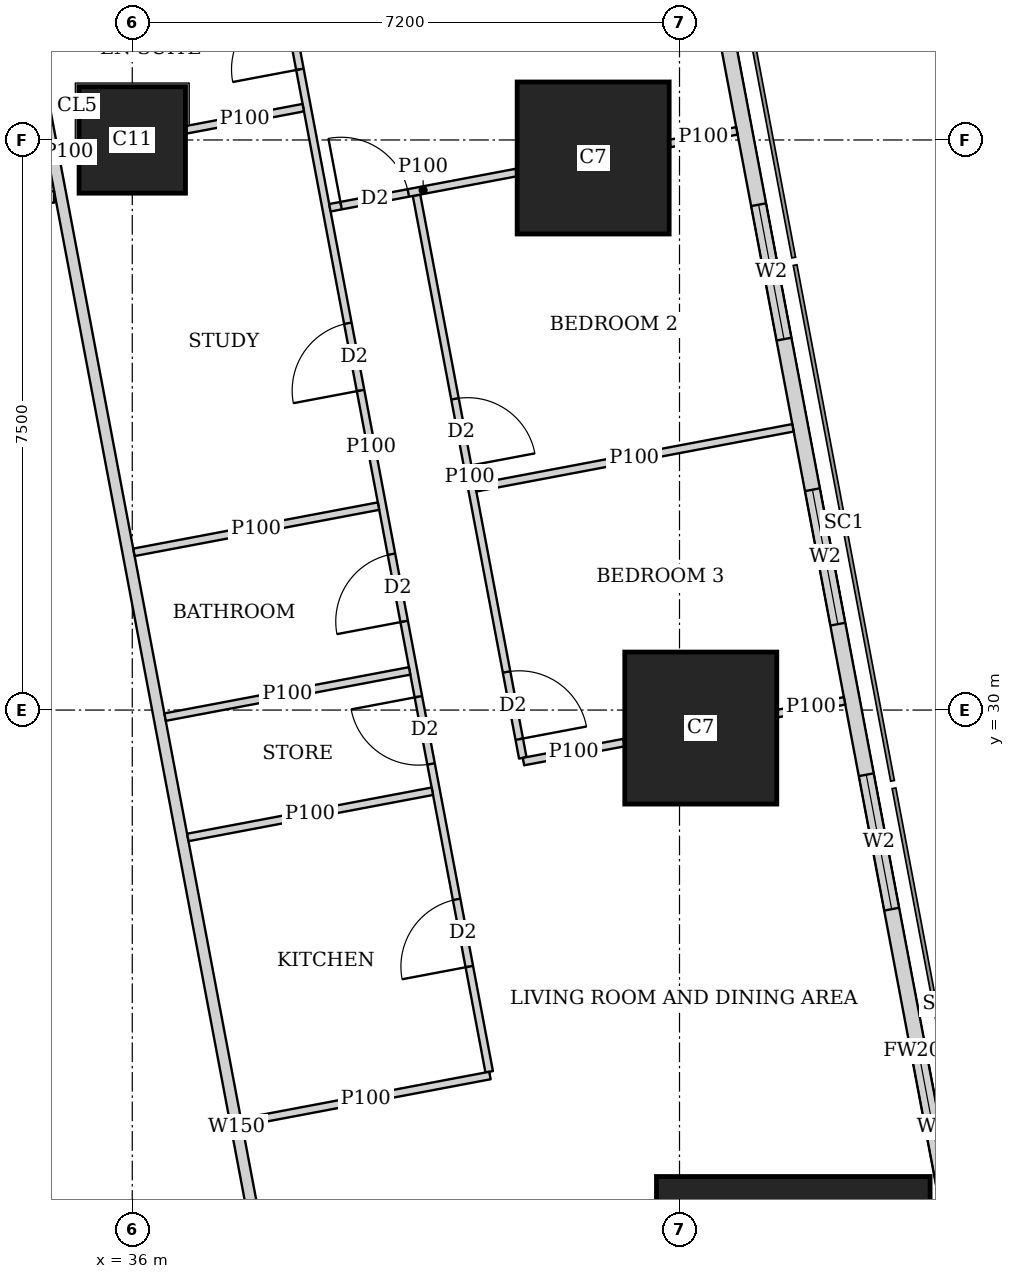
"""IFC4 building model, lengths in metres.
Left out: names, types, materials, properties, quantities, classifications, styles, units other than length and angle.
Written with IfcOpenShell. Run it as: python <this file> out.ifc"""

import sys

from ifc_helpers import new_model, si_unit, direction, frame, frame_2d, origin, origin_2d, place, context, subcontext, project, spatial, rectangle, extrude, element, fill, save


model = new_model("IFC4")
c1 = context("Model", 3, precision=1e-05, world=origin(), true_north=direction((0.0, 1.0)))
c2 = subcontext(c1, "Body", "Model", "MODEL_VIEW")
j1 = project(units=[si_unit("LENGTHUNIT", "METRE"), si_unit("PLANEANGLEUNIT", "RADIAN")], contexts=[c1])
p1 = place(None, origin())
s1 = spatial("IfcSite", under=j1, at=p1, CompositionType="ELEMENT")
p2 = place(p1, origin())
s2 = spatial("IfcBuilding", under=s1, at=p2, CompositionType="ELEMENT")
p3 = place(p2, frame((0.0, 0.0, 289.1)))
s3 = spatial("IfcBuildingStorey", under=s2, at=p3, CompositionType="ELEMENT", Elevation=289.1)
p4 = place(p3, frame((44.697, 22.263, 0.0), z_axis=(0.0, 0.0, 1.0), x_axis=(1.0, 0.0, 0.0)))
e1 = element("IfcColumn", 1, at=p4, inside=s3, PredefinedType="COLUMN", context=c2, shape_type="SweptSolid", body=[
    extrude(rectangle(XDim=3.6, YDim=3.2, at=origin_2d()), origin(), (0.0, 0.0, 1.0), 3.75),
])
p5 = place(p3, frame((43.48, 29.763, 0.0), z_axis=(0.0, 0.0, 1.0), x_axis=(1.0, 0.0, 0.0)))
e2 = element("IfcColumn", 2, at=p5, inside=s3, PredefinedType="COLUMN", context=c2, shape_type="SweptSolid", body=[
    extrude(rectangle(XDim=2.0, YDim=2.0, at=origin_2d()), origin(), (0.0, 0.0, 1.0), 3.75),
])
p6 = place(p3, frame((36.0, 37.5, 0.0), z_axis=(0.0, 0.0, 1.0), x_axis=(1.0, 0.0, 0.0)))
e3 = element("IfcColumn", 3, at=p6, inside=s3, PredefinedType="COLUMN", context=c2, shape_type="SweptSolid", body=[
    extrude(rectangle(XDim=1.4, YDim=1.4, at=origin_2d()), origin(), (0.0, 0.0, 1.0), 3.75),
])
p7 = place(p3, frame((42.064, 37.263, 0.0), z_axis=(0.0, 0.0, 1.0), x_axis=(1.0, 0.0, 0.0)))
e4 = element("IfcColumn", 4, at=p7, inside=s3, PredefinedType="COLUMN", context=c2, shape_type="SweptSolid", body=[
    extrude(rectangle(XDim=2.0, YDim=2.0, at=origin_2d()), origin(), (0.0, 0.0, 1.0), 3.75),
])
p8 = place(p3, frame((49.684, 7.832, 0.0), z_axis=(0.0, 0.0, 1.0), x_axis=(-0.185616669694, 0.982622232565, 0.0)))
e5 = element("IfcWall", 5, at=p8, inside=s3, PredefinedType="SOLIDWALL", context=c2, shape_type="SweptSolid", body=[
    extrude(rectangle(XDim=36.0, YDim=0.2, at=frame_2d((18.0, 0.0))), origin(), (0.0, 0.0, 1.0), 3.5),
])
p9 = place(p8, frame((2.518, 0.0, 0.9)))
e6 = element("IfcOpeningElement", 6, at=p9, cuts=e5, PredefinedType="OPENING", context=c2, shape_type="SweptSolid", body=[
    extrude(rectangle(XDim=2.4, YDim=1.5, at=frame_2d((1.2, 0.75))), frame((0.0, 0.11, 0.0), z_axis=(0.0, -1.0, 0.0), x_axis=(1.0, 0.0, 0.0)), (0.0, 0.0, 1.0), 0.22),
])
p10 = place(p8, frame((8.444, 0.0, 0.9)))
e7 = element("IfcOpeningElement", 7, at=p10, cuts=e5, PredefinedType="OPENING", context=c2, shape_type="SweptSolid", body=[
    extrude(rectangle(XDim=1.8, YDim=1.5, at=frame_2d((0.9, 0.75))), frame((0.0, 0.11, 0.0), z_axis=(0.0, -1.0, 0.0), x_axis=(1.0, 0.0, 0.0)), (0.0, 0.0, 1.0), 0.22),
])
p11 = place(p8, frame((12.261, 0.0, 0.9)))
e8 = element("IfcOpeningElement", 8, at=p11, cuts=e5, PredefinedType="OPENING", context=c2, shape_type="SweptSolid", body=[
    extrude(rectangle(XDim=1.8, YDim=1.5, at=frame_2d((0.9, 0.75))), frame((0.0, 0.11, 0.0), z_axis=(0.0, -1.0, 0.0), x_axis=(1.0, 0.0, 0.0)), (0.0, 0.0, 1.0), 0.22),
])
p12 = place(p8, frame((16.078, 0.0, 0.9)))
e9 = element("IfcOpeningElement", 9, at=p12, cuts=e5, PredefinedType="OPENING", context=c2, shape_type="SweptSolid", body=[
    extrude(rectangle(XDim=1.8, YDim=1.5, at=frame_2d((0.9, 0.75))), frame((0.0, 0.11, 0.0), z_axis=(0.0, -1.0, 0.0), x_axis=(1.0, 0.0, 0.0)), (0.0, 0.0, 1.0), 0.22),
])
p13 = place(p8, frame((19.894, 0.0, 0.9)))
e10 = element("IfcOpeningElement", 10, at=p13, cuts=e5, PredefinedType="OPENING", context=c2, shape_type="SweptSolid", body=[
    extrude(rectangle(XDim=1.8, YDim=1.5, at=frame_2d((0.9, 0.75))), frame((0.0, 0.11, 0.0), z_axis=(0.0, -1.0, 0.0), x_axis=(1.0, 0.0, 0.0)), (0.0, 0.0, 1.0), 0.22),
])
p14 = place(p8, frame((23.71, 0.0, 0.9)))
e11 = element("IfcOpeningElement", 11, at=p14, cuts=e5, PredefinedType="OPENING", context=c2, shape_type="SweptSolid", body=[
    extrude(rectangle(XDim=1.8, YDim=1.5, at=frame_2d((0.9, 0.75))), frame((0.0, 0.11, 0.0), z_axis=(0.0, -1.0, 0.0), x_axis=(1.0, 0.0, 0.0)), (0.0, 0.0, 1.0), 0.22),
])
p15 = place(p8, frame((27.526, 0.0, 0.9)))
e12 = element("IfcOpeningElement", 12, at=p15, cuts=e5, PredefinedType="OPENING", context=c2, shape_type="SweptSolid", body=[
    extrude(rectangle(XDim=1.8, YDim=1.5, at=frame_2d((0.9, 0.75))), frame((0.0, 0.11, 0.0), z_axis=(0.0, -1.0, 0.0), x_axis=(1.0, 0.0, 0.0)), (0.0, 0.0, 1.0), 0.22),
])
p16 = place(p8, frame((32.046, 0.0, 0.9)))
e13 = element("IfcOpeningElement", 13, at=p16, cuts=e5, PredefinedType="OPENING", context=c2, shape_type="SweptSolid", body=[
    extrude(rectangle(XDim=1.8, YDim=1.5, at=frame_2d((0.9, 0.75))), frame((0.0, 0.11, 0.0), z_axis=(0.0, -1.0, 0.0), x_axis=(1.0, 0.0, 0.0)), (0.0, 0.0, 1.0), 0.22),
])
p17 = place(p3, frame((29.501, 36.75, 0.0), z_axis=(0.0, 0.0, 1.0), x_axis=(1.0, 0.0, 0.0)))
e14 = element("IfcWall", 14, at=p17, inside=s3, PredefinedType="SOLIDWALL", context=c2, shape_type="SweptSolid", body=[
    extrude(rectangle(XDim=5.471, YDim=0.15, at=frame_2d((2.735, 0.0))), origin(), (0.0, 0.0, 1.0), 3.5),
])
p18 = place(p3, frame((34.036, 42.186, 0.0), z_axis=(0.0, 0.0, 1.0), x_axis=(0.185593518645, -0.9826266055, 0.0)))
e15 = element("IfcWall", 15, at=p18, inside=s3, PredefinedType="SOLIDWALL", context=c2, shape_type="SweptSolid", body=[
    extrude(rectangle(XDim=35.961, YDim=0.15, at=frame_2d((17.98, 0.0))), origin(), (0.0, 0.0, 1.0), 2.5),
])
p19 = place(p18, frame((19.345, 0.0, 0.0)))
e16 = element("IfcOpeningElement", 16, at=p19, cuts=e15, PredefinedType="OPENING", context=c2, shape_type="SweptSolid", body=[
    extrude(rectangle(XDim=1.0, YDim=2.1, at=frame_2d((0.5, 1.05))), frame((0.0, 0.085, 0.0), z_axis=(0.0, -1.0, 0.0), x_axis=(1.0, 0.0, 0.0)), (0.0, 0.0, 1.0), 0.17),
])
p20 = place(p18, frame((33.774, 0.0, 0.0)))
e17 = element("IfcOpeningElement", 17, at=p20, cuts=e15, PredefinedType="OPENING", context=c2, shape_type="SweptSolid", body=[
    extrude(rectangle(XDim=1.0, YDim=2.1, at=frame_2d((0.5, 1.05))), frame((0.0, 0.085, 0.0), z_axis=(0.0, -1.0, 0.0), x_axis=(1.0, 0.0, 0.0)), (0.0, 0.0, 1.0), 0.17),
])
p21 = place(p3, frame((43.955, 37.62, 0.0), z_axis=(0.0, 0.0, 1.0), x_axis=(-0.982708424405, -0.18515980288, 0.0)))
e18 = element("IfcWall", 18, at=p21, inside=s3, PredefinedType="PARTITIONING", context=c2, shape_type="SweptSolid", body=[
    extrude(rectangle(XDim=0.897, YDim=0.1, at=frame_2d((0.448, 0.0))), origin(), (0.0, 0.0, 1.0), 3.5),
])
p22 = place(p3, frame((41.054, 37.072, 0.0), z_axis=(0.0, 0.0, 1.0), x_axis=(-0.982579896219, -0.185840650951, 0.0)))
e19 = element("IfcWall", 19, at=p22, inside=s3, PredefinedType="PARTITIONING", context=c2, shape_type="SweptSolid", body=[
    extrude(rectangle(XDim=2.497, YDim=0.1, at=frame_2d((1.249, 0.0))), origin(), (0.0, 0.0, 1.0), 3.5),
])
p23 = place(p22, frame((1.447, 0.0, 0.0)))
e20 = element("IfcOpeningElement", 20, at=p23, cuts=e19, PredefinedType="OPENING", context=c2, shape_type="SweptSolid", body=[
    extrude(rectangle(XDim=0.9, YDim=2.1, at=frame_2d((0.45, 1.05))), frame((0.0, 0.06, 0.0), z_axis=(0.0, -1.0, 0.0), x_axis=(1.0, 0.0, 0.0)), (0.0, 0.0, 1.0), 0.12),
])
p24 = place(p3, frame((44.693, 33.713, 0.0), z_axis=(0.0, 0.0, 1.0), x_axis=(-0.982623519589, -0.185609856287, 0.0)))
e21 = element("IfcWall", 21, at=p24, inside=s3, PredefinedType="PARTITIONING", context=c2, shape_type="SweptSolid", body=[
    extrude(rectangle(XDim=4.25, YDim=0.1, at=frame_2d((2.125, 0.0))), origin(), (0.0, 0.0, 1.0), 2.5),
])
p25 = place(p3, frame((45.372, 30.121, 0.0), z_axis=(0.0, 0.0, 1.0), x_axis=(-0.982547416156, -0.186012297994, 0.0)))
e22 = element("IfcWall", 22, at=p25, inside=s3, PredefinedType="PARTITIONING", context=c2, shape_type="SweptSolid", body=[
    extrude(rectangle(XDim=0.898, YDim=0.1, at=frame_2d((0.449, 0.0))), origin(), (0.0, 0.0, 1.0), 3.5),
])
p26 = place(p3, frame((42.47, 29.572, 0.0), z_axis=(0.0, 0.0, 1.0), x_axis=(-0.982610503289, -0.185678751683, 0.0)))
e23 = element("IfcWall", 23, at=p26, inside=s3, PredefinedType="PARTITIONING", context=c2, shape_type="SweptSolid", body=[
    extrude(rectangle(XDim=1.346, YDim=0.1, at=frame_2d((0.673, 0.0))), origin(), (0.0, 0.0, 1.0), 2.5),
])
p27 = place(p3, frame((38.25, 37.925, 0.0), z_axis=(0.0, 0.0, 1.0), x_axis=(-0.982610209589, -0.185680305934, 0.0)))
e24 = element("IfcWall", 24, at=p27, inside=s3, PredefinedType="PARTITIONING", context=c2, shape_type="SweptSolid", body=[
    extrude(rectangle(XDim=1.567, YDim=0.1, at=frame_2d((0.784, 0.0))), origin(), (0.0, 0.0, 1.0), 3.5),
])
p28 = place(p3, frame((35.29, 37.366, 0.0), z_axis=(0.0, 0.0, 1.0), x_axis=(-0.982395465615, -0.18681313963, 0.0)))
e25 = element("IfcWall", 25, at=p28, inside=s3, PredefinedType="PARTITIONING", context=c2, shape_type="SweptSolid", body=[
    extrude(rectangle(XDim=0.263, YDim=0.1, at=frame_2d((0.131, 0.0))), origin(), (0.0, 0.0, 1.0), 3.5),
])
p29 = place(p3, frame((39.24, 32.683, 0.0), z_axis=(0.0, 0.0, 1.0), x_axis=(-0.982607026909, -0.185697147715, 0.0)))
e26 = element("IfcWall", 26, at=p29, inside=s3, PredefinedType="PARTITIONING", context=c2, shape_type="SweptSolid", body=[
    extrude(rectangle(XDim=3.275, YDim=0.1, at=frame_2d((1.637, 0.0))), origin(), (0.0, 0.0, 1.0), 3.5),
])
p30 = place(p3, frame((39.948, 28.932, 0.0), z_axis=(0.0, 0.0, 1.0), x_axis=(-0.982610347627, -0.185679575441, 0.0)))
e27 = element("IfcWall", 27, at=p30, inside=s3, PredefinedType="PARTITIONING", context=c2, shape_type="SweptSolid", body=[
    extrude(rectangle(XDim=3.274, YDim=0.1, at=frame_2d((1.637, 0.0))), origin(), (0.0, 0.0, 1.0), 3.5),
])
p31 = place(p3, frame((40.706, 25.192, 0.0), z_axis=(0.0, 0.0, 1.0), x_axis=(-0.982633623707, -0.185556356831, 0.0)))
e28 = element("IfcWall", 28, at=p31, inside=s3, PredefinedType="PARTITIONING", context=c2, shape_type="SweptSolid", body=[
    extrude(rectangle(XDim=3.325, YDim=0.1, at=frame_2d((1.663, 0.0))), origin(), (0.0, 0.0, 1.0), 3.5),
])
p32 = place(p3, frame((39.649, 30.515, 0.0), z_axis=(0.0, 0.0, 1.0), x_axis=(-0.982610347627, -0.185679575441, 0.0)))
e29 = element("IfcWall", 29, at=p32, inside=s3, PredefinedType="PARTITIONING", context=c2, shape_type="SweptSolid", body=[
    extrude(rectangle(XDim=3.274, YDim=0.1, at=frame_2d((1.637, 0.0))), origin(), (0.0, 0.0, 1.0), 2.5),
])
p33 = place(p3, frame((37.591, 41.685, 0.0), z_axis=(0.0, 0.0, 1.0), x_axis=(0.185541820726, -0.982636368532, 0.0)))
e30 = element("IfcWall", 30, at=p33, inside=s3, PredefinedType="PARTITIONING", context=c2, shape_type="SweptSolid", body=[
    extrude(rectangle(XDim=16.735, YDim=0.1, at=frame_2d((8.367, 0.0))), origin(), (0.0, 0.0, 1.0), 2.5),
])
p34 = place(p33, frame((2.413, 0.0, 0.0)))
e31 = element("IfcOpeningElement", 31, at=p34, cuts=e30, PredefinedType="OPENING", context=c2, shape_type="SweptSolid", body=[
    extrude(rectangle(XDim=0.9, YDim=2.1, at=frame_2d((0.45, 1.05))), frame((0.0, 0.06, 0.0), z_axis=(0.0, -1.0, 0.0), x_axis=(1.0, 0.0, 0.0)), (0.0, 0.0, 1.0), 0.12),
])
p35 = place(p33, frame((6.713, 0.0, 0.0)))
e32 = element("IfcOpeningElement", 32, at=p35, cuts=e30, PredefinedType="OPENING", context=c2, shape_type="SweptSolid", body=[
    extrude(rectangle(XDim=0.9, YDim=2.1, at=frame_2d((0.45, 1.05))), frame((0.0, 0.06, 0.0), z_axis=(0.0, -1.0, 0.0), x_axis=(1.0, 0.0, 0.0)), (0.0, 0.0, 1.0), 0.12),
])
p36 = place(p33, frame((9.805, 0.0, 0.0)))
e33 = element("IfcOpeningElement", 33, at=p36, cuts=e30, PredefinedType="OPENING", context=c2, shape_type="SweptSolid", body=[
    extrude(rectangle(XDim=0.9, YDim=2.1, at=frame_2d((0.45, 1.05))), frame((0.0, 0.06, 0.0), z_axis=(0.0, -1.0, 0.0), x_axis=(1.0, 0.0, 0.0)), (0.0, 0.0, 1.0), 0.12),
])
p37 = place(p33, frame((11.713, 0.0, 0.0)))
e34 = element("IfcOpeningElement", 34, at=p37, cuts=e30, PredefinedType="OPENING", context=c2, shape_type="SweptSolid", body=[
    extrude(rectangle(XDim=0.9, YDim=2.1, at=frame_2d((0.45, 1.05))), frame((0.0, 0.06, 0.0), z_axis=(0.0, -1.0, 0.0), x_axis=(1.0, 0.0, 0.0)), (0.0, 0.0, 1.0), 0.12),
])
p38 = place(p33, frame((14.426, 0.0, 0.0)))
e35 = element("IfcOpeningElement", 35, at=p38, cuts=e30, PredefinedType="OPENING", context=c2, shape_type="SweptSolid", body=[
    extrude(rectangle(XDim=0.9, YDim=2.1, at=frame_2d((0.45, 1.05))), frame((0.0, 0.06, 0.0), z_axis=(0.0, -1.0, 0.0), x_axis=(1.0, 0.0, 0.0)), (0.0, 0.0, 1.0), 0.12),
])
p39 = place(p3, frame((39.74, 36.773, 0.0), z_axis=(0.0, 0.0, 1.0), x_axis=(0.185583825641, -0.982628436216, 0.0)))
e36 = element("IfcWall", 36, at=p39, inside=s3, PredefinedType="PARTITIONING", context=c2, shape_type="SweptSolid", body=[
    extrude(rectangle(XDim=7.533, YDim=0.1, at=frame_2d((3.766, 0.0))), origin(), (0.0, 0.0, 1.0), 2.5),
])
p40 = place(p39, frame((2.726, 0.0, 0.0)))
e37 = element("IfcOpeningElement", 37, at=p40, cuts=e36, PredefinedType="OPENING", context=c2, shape_type="SweptSolid", body=[
    extrude(rectangle(XDim=0.9, YDim=2.1, at=frame_2d((0.45, 1.05))), frame((0.0, 0.06, 0.0), z_axis=(0.0, -1.0, 0.0), x_axis=(1.0, 0.0, 0.0)), (0.0, 0.0, 1.0), 0.12),
])
p41 = place(p39, frame((6.383, 0.0, 0.0)))
e38 = element("IfcOpeningElement", 38, at=p41, cuts=e36, PredefinedType="OPENING", context=c2, shape_type="SweptSolid", body=[
    extrude(rectangle(XDim=0.9, YDim=2.1, at=frame_2d((0.45, 1.05))), frame((0.0, 0.06, 0.0), z_axis=(0.0, -1.0, 0.0), x_axis=(1.0, 0.0, 0.0)), (0.0, 0.0, 1.0), 0.12),
])
p42 = place(p3, frame((35.83, 15.713, 0.0), z_axis=(0.0, 0.0, 1.0), x_axis=(-0.185534724166, 0.982637708481, 0.0)))
e39 = element("IfcWall", 39, at=p42, inside=s3, PredefinedType="PARTITIONING", context=c2, shape_type="SweptSolid", body=[
    extrude(rectangle(XDim=13.814, YDim=0.125, at=frame_2d((6.907, 0.0))), origin(), (0.0, 0.0, 1.0), 2.5),
])
p43 = place(p42, frame((5.35, 0.0, 0.0)))
e40 = element("IfcOpeningElement", 40, at=p43, cuts=e39, PredefinedType="OPENING", context=c2, shape_type="SweptSolid", body=[
    extrude(rectangle(XDim=1.0, YDim=2.1, at=frame_2d((0.5, 1.05))), frame((0.0, 0.073, 0.0), z_axis=(0.0, -1.0, 0.0), x_axis=(1.0, 0.0, 0.0)), (0.0, 0.0, 1.0), 0.145),
])
p44 = place(p12, origin())
e41 = element("IfcWindow", 41, at=p44, inside=s3, PartitioningType="SINGLE_PANEL", PredefinedType="WINDOW", context=c2, shape_type="SweptSolid", body=[
    extrude(rectangle(XDim=1.8, YDim=1.5, at=frame_2d((0.9, 0.75))), frame((0.0, 0.03, 0.0), z_axis=(0.0, -1.0, 0.0), x_axis=(1.0, 0.0, 0.0)), (0.0, 0.0, 1.0), 0.06),
])
fill(e9, e41)
p45 = place(p13, origin())
e42 = element("IfcWindow", 42, at=p45, inside=s3, PartitioningType="SINGLE_PANEL", PredefinedType="WINDOW", context=c2, shape_type="SweptSolid", body=[
    extrude(rectangle(XDim=1.8, YDim=1.5, at=frame_2d((0.9, 0.75))), frame((0.0, 0.03, 0.0), z_axis=(0.0, -1.0, 0.0), x_axis=(1.0, 0.0, 0.0)), (0.0, 0.0, 1.0), 0.06),
])
fill(e10, e42)
p46 = place(p14, origin())
e43 = element("IfcWindow", 43, at=p46, inside=s3, PartitioningType="SINGLE_PANEL", PredefinedType="WINDOW", context=c2, shape_type="SweptSolid", body=[
    extrude(rectangle(XDim=1.8, YDim=1.5, at=frame_2d((0.9, 0.75))), frame((0.0, 0.03, 0.0), z_axis=(0.0, -1.0, 0.0), x_axis=(1.0, 0.0, 0.0)), (0.0, 0.0, 1.0), 0.06),
])
fill(e11, e43)
p47 = place(p15, origin())
e44 = element("IfcWindow", 44, at=p47, inside=s3, PartitioningType="SINGLE_PANEL", PredefinedType="WINDOW", context=c2, shape_type="SweptSolid", body=[
    extrude(rectangle(XDim=1.8, YDim=1.5, at=frame_2d((0.9, 0.75))), frame((0.0, 0.03, 0.0), z_axis=(0.0, -1.0, 0.0), x_axis=(1.0, 0.0, 0.0)), (0.0, 0.0, 1.0), 0.06),
])
fill(e12, e44)
p48 = place(p23, origin())
e45 = element("IfcDoor", 45, at=p48, inside=s3, OperationType="SINGLE_SWING_LEFT", PredefinedType="DOOR", context=c2, shape_type="SweptSolid", body=[
    extrude(rectangle(XDim=0.9, YDim=2.1, at=frame_2d((0.45, 1.05))), frame((0.0, 0.025, 0.0), z_axis=(0.0, -1.0, 0.0), x_axis=(1.0, 0.0, 0.0)), (0.0, 0.0, 1.0), 0.05),
])
fill(e20, e45)
p49 = place(p34, origin())
e46 = element("IfcDoor", 46, at=p49, inside=s3, OperationType="SINGLE_SWING_LEFT", PredefinedType="DOOR", context=c2, shape_type="SweptSolid", body=[
    extrude(rectangle(XDim=0.9, YDim=2.1, at=frame_2d((0.45, 1.05))), frame((0.0, 0.025, 0.0), z_axis=(0.0, -1.0, 0.0), x_axis=(1.0, 0.0, 0.0)), (0.0, 0.0, 1.0), 0.05),
])
fill(e31, e46)
p50 = place(p35, origin())
e47 = element("IfcDoor", 47, at=p50, inside=s3, OperationType="SINGLE_SWING_LEFT", PredefinedType="DOOR", context=c2, shape_type="SweptSolid", body=[
    extrude(rectangle(XDim=0.9, YDim=2.1, at=frame_2d((0.45, 1.05))), frame((0.0, 0.025, 0.0), z_axis=(0.0, -1.0, 0.0), x_axis=(1.0, 0.0, 0.0)), (0.0, 0.0, 1.0), 0.05),
])
fill(e32, e47)
p51 = place(p36, origin())
e48 = element("IfcDoor", 48, at=p51, inside=s3, OperationType="SINGLE_SWING_LEFT", PredefinedType="DOOR", context=c2, shape_type="SweptSolid", body=[
    extrude(rectangle(XDim=0.9, YDim=2.1, at=frame_2d((0.45, 1.05))), frame((0.0, 0.025, 0.0), z_axis=(0.0, -1.0, 0.0), x_axis=(1.0, 0.0, 0.0)), (0.0, 0.0, 1.0), 0.05),
])
fill(e33, e48)
p52 = place(p37, origin())
e49 = element("IfcDoor", 49, at=p52, inside=s3, OperationType="SINGLE_SWING_RIGHT", PredefinedType="DOOR", context=c2, shape_type="SweptSolid", body=[
    extrude(rectangle(XDim=0.9, YDim=2.1, at=frame_2d((0.45, 1.05))), frame((0.0, 0.025, 0.0), z_axis=(0.0, -1.0, 0.0), x_axis=(1.0, 0.0, 0.0)), (0.0, 0.0, 1.0), 0.05),
])
fill(e34, e49)
p53 = place(p38, origin())
e50 = element("IfcDoor", 50, at=p53, inside=s3, OperationType="SINGLE_SWING_LEFT", PredefinedType="DOOR", context=c2, shape_type="SweptSolid", body=[
    extrude(rectangle(XDim=0.9, YDim=2.1, at=frame_2d((0.45, 1.05))), frame((0.0, 0.025, 0.0), z_axis=(0.0, -1.0, 0.0), x_axis=(1.0, 0.0, 0.0)), (0.0, 0.0, 1.0), 0.05),
])
fill(e35, e50)
p54 = place(p40, origin())
e51 = element("IfcDoor", 51, at=p54, inside=s3, OperationType="SINGLE_SWING_RIGHT", PredefinedType="DOOR", context=c2, shape_type="SweptSolid", body=[
    extrude(rectangle(XDim=0.9, YDim=2.1, at=frame_2d((0.45, 1.05))), frame((0.0, 0.025, 0.0), z_axis=(0.0, -1.0, 0.0), x_axis=(1.0, 0.0, 0.0)), (0.0, 0.0, 1.0), 0.05),
])
fill(e37, e51)
p55 = place(p41, origin())
e52 = element("IfcDoor", 52, at=p55, inside=s3, OperationType="SINGLE_SWING_RIGHT", PredefinedType="DOOR", context=c2, shape_type="SweptSolid", body=[
    extrude(rectangle(XDim=0.9, YDim=2.1, at=frame_2d((0.45, 1.05))), frame((0.0, 0.025, 0.0), z_axis=(0.0, -1.0, 0.0), x_axis=(1.0, 0.0, 0.0)), (0.0, 0.0, 1.0), 0.05),
])
fill(e38, e52)
save(model, sys.argv[1])
